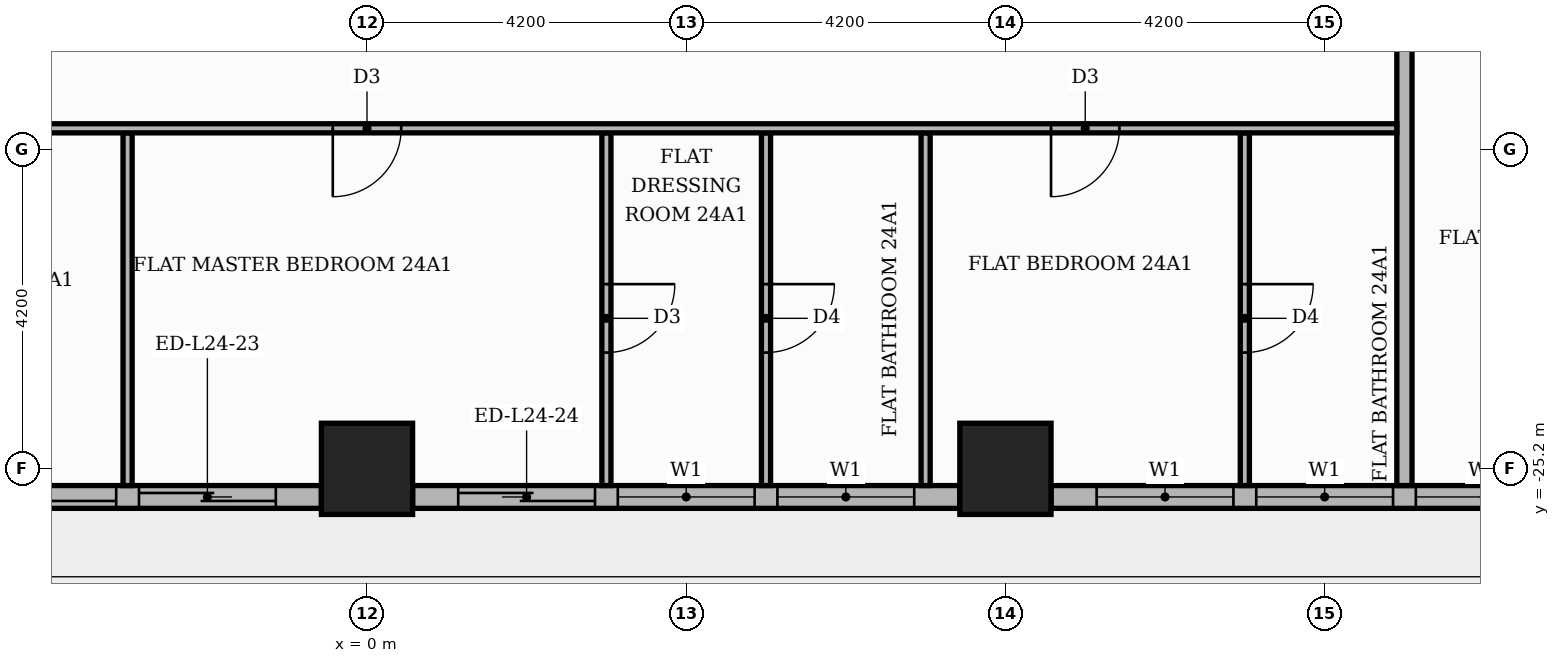
"""IFC4 building model, lengths in metres.
Left out: names, types, materials, properties, quantities, classifications, styles, units other than length and angle.
Written with IfcOpenShell. Run it as: python <this file> out.ifc"""

import sys

from ifc_helpers import new_model, si_unit, direction, frame, frame_2d, origin, origin_2d, place, context, subcontext, project, spatial, rectangle, extrude, element, fill, save


model = new_model("IFC4")
c1 = context("Model", 3, precision=1e-05, world=origin(), true_north=direction((0.0, 1.0)))
c2 = subcontext(c1, "Body", "Model", "MODEL_VIEW")
j1 = project(units=[si_unit("LENGTHUNIT", "METRE"), si_unit("PLANEANGLEUNIT", "RADIAN")], contexts=[c1])
p1 = place(None, origin())
s1 = spatial("IfcSite", under=j1, at=p1, CompositionType="ELEMENT")
p2 = place(p1, origin())
s2 = spatial("IfcBuilding", under=s1, at=p2, CompositionType="ELEMENT")
p3 = place(p2, frame((0.0, 0.0, 102.6)))
s3 = spatial("IfcBuildingStorey", under=s2, at=p3, CompositionType="ELEMENT", Elevation=102.6)
for number, where, z_axis, x_axis in (
    (1, (0.0, -25.2, 0.0), (0.0, 0.0, 1.0), (1.0, 0.0, 0.0)),
    (2, (8.4, -25.2, 0.0), (0.0, 0.0, 1.0), (1.0, 0.0, 0.0)),
):
    element("IfcColumn", number, at=place(p3, frame(where, z_axis=z_axis, x_axis=x_axis)), inside=s3, PredefinedType="COLUMN", context=c2, shape_type="SweptSolid", body=[
        extrude(rectangle(XDim=1.2, YDim=1.2, at=origin_2d()), origin(), (0.0, 0.0, 1.0), 3.9),
    ])
p4 = place(p3, frame((-7.8, -25.57, 0.0), z_axis=(0.0, 0.0, 1.0), x_axis=(1.0, 0.0, 0.0)))
e3 = element("IfcWall", 3, at=p4, inside=s3, PredefinedType="STANDARD", context=c2, shape_type="SweptSolid", body=[
    extrude(rectangle(XDim=7.2, YDim=0.3, at=frame_2d((3.6, 0.0))), origin(), (0.0, 0.0, 1.0), 3.48),
])
p5 = place(p4, frame((0.6, 0.0, 0.0)))
e4 = element("IfcOpeningElement", 4, at=p5, cuts=e3, PredefinedType="OPENING", context=c2, shape_type="SweptSolid", body=[
    extrude(rectangle(XDim=3.9, YDim=2.4, at=frame_2d((1.95, 1.2))), frame((0.0, 0.16, 0.0), z_axis=(0.0, -1.0, 0.0), x_axis=(1.0, 0.0, 0.0)), (0.0, 0.0, 1.0), 0.32),
])
p6 = place(p4, frame((4.8, 0.0, 0.0)))
e5 = element("IfcOpeningElement", 5, at=p6, cuts=e3, PredefinedType="OPENING", context=c2, shape_type="SweptSolid", body=[
    extrude(rectangle(XDim=1.8, YDim=2.4, at=frame_2d((0.9, 1.2))), frame((0.0, 0.16, 0.0), z_axis=(0.0, -1.0, 0.0), x_axis=(1.0, 0.0, 0.0)), (0.0, 0.0, 1.0), 0.32),
])
p7 = place(p3, frame((0.6, -25.57, 0.0), z_axis=(0.0, 0.0, 1.0), x_axis=(1.0, 0.0, 0.0)))
e6 = element("IfcWall", 6, at=p7, inside=s3, PredefinedType="STANDARD", context=c2, shape_type="SweptSolid", body=[
    extrude(rectangle(XDim=7.2, YDim=0.3, at=frame_2d((3.6, 0.0))), origin(), (0.0, 0.0, 1.0), 3.48),
])
p8 = place(p7, frame((0.6, 0.0, 0.0)))
e7 = element("IfcOpeningElement", 7, at=p8, cuts=e6, PredefinedType="OPENING", context=c2, shape_type="SweptSolid", body=[
    extrude(rectangle(XDim=1.8, YDim=2.4, at=frame_2d((0.9, 1.2))), frame((0.0, 0.16, 0.0), z_axis=(0.0, -1.0, 0.0), x_axis=(1.0, 0.0, 0.0)), (0.0, 0.0, 1.0), 0.32),
])
p9 = place(p7, frame((2.7, 0.0, 0.9)))
e8 = element("IfcOpeningElement", 8, at=p9, cuts=e6, PredefinedType="OPENING", context=c2, shape_type="SweptSolid", body=[
    extrude(rectangle(XDim=1.8, YDim=2.1, at=frame_2d((0.9, 1.05))), frame((0.0, 0.16, 0.0), z_axis=(0.0, -1.0, 0.0), x_axis=(1.0, 0.0, 0.0)), (0.0, 0.0, 1.0), 0.32),
])
p10 = place(p7, frame((4.8, 0.0, 0.9)))
e9 = element("IfcOpeningElement", 9, at=p10, cuts=e6, PredefinedType="OPENING", context=c2, shape_type="SweptSolid", body=[
    extrude(rectangle(XDim=1.8, YDim=2.1, at=frame_2d((0.9, 1.05))), frame((0.0, 0.16, 0.0), z_axis=(0.0, -1.0, 0.0), x_axis=(1.0, 0.0, 0.0)), (0.0, 0.0, 1.0), 0.32),
])
p11 = place(p3, frame((9.0, -25.57, 0.0), z_axis=(0.0, 0.0, 1.0), x_axis=(1.0, 0.0, 0.0)))
e10 = element("IfcWall", 10, at=p11, inside=s3, PredefinedType="STANDARD", context=c2, shape_type="SweptSolid", body=[
    extrude(rectangle(XDim=7.2, YDim=0.3, at=frame_2d((3.6, 0.0))), origin(), (0.0, 0.0, 1.0), 3.48),
])
p12 = place(p11, frame((0.6, 0.0, 0.9)))
e11 = element("IfcOpeningElement", 11, at=p12, cuts=e10, PredefinedType="OPENING", context=c2, shape_type="SweptSolid", body=[
    extrude(rectangle(XDim=1.8, YDim=2.1, at=frame_2d((0.9, 1.05))), frame((0.0, 0.16, 0.0), z_axis=(0.0, -1.0, 0.0), x_axis=(1.0, 0.0, 0.0)), (0.0, 0.0, 1.0), 0.32),
])
p13 = place(p11, frame((2.7, 0.0, 0.9)))
e12 = element("IfcOpeningElement", 12, at=p13, cuts=e10, PredefinedType="OPENING", context=c2, shape_type="SweptSolid", body=[
    extrude(rectangle(XDim=1.8, YDim=2.1, at=frame_2d((0.9, 1.05))), frame((0.0, 0.16, 0.0), z_axis=(0.0, -1.0, 0.0), x_axis=(1.0, 0.0, 0.0)), (0.0, 0.0, 1.0), 0.32),
])
p14 = place(p11, frame((4.8, 0.0, 0.9)))
e13 = element("IfcOpeningElement", 13, at=p14, cuts=e10, PredefinedType="OPENING", context=c2, shape_type="SweptSolid", body=[
    extrude(rectangle(XDim=1.8, YDim=2.1, at=frame_2d((0.9, 1.05))), frame((0.0, 0.16, 0.0), z_axis=(0.0, -1.0, 0.0), x_axis=(1.0, 0.0, 0.0)), (0.0, 0.0, 1.0), 0.32),
])
p15 = place(p3, frame((-3.15, -25.42, 0.0), z_axis=(0.0, 0.0, 1.0), x_axis=(0.0, 1.0, 0.0)))
e14 = element("IfcWall", 14, at=p15, inside=s3, PredefinedType="PARTITIONING", context=c2, shape_type="SweptSolid", body=[
    extrude(rectangle(XDim=4.64, YDim=0.12, at=frame_2d((2.32, 0.0))), origin(), (0.0, 0.0, 1.0), 3.48),
])
p16 = place(p3, frame((3.15, -25.42, 0.0), z_axis=(0.0, 0.0, 1.0), x_axis=(0.0, 1.0, 0.0)))
e15 = element("IfcWall", 15, at=p16, inside=s3, PredefinedType="PARTITIONING", context=c2, shape_type="SweptSolid", body=[
    extrude(rectangle(XDim=4.64, YDim=0.12, at=frame_2d((2.32, 0.0))), origin(), (0.0, 0.0, 1.0), 3.48),
])
p17 = place(p16, frame((1.75, 0.0, 0.0)))
e16 = element("IfcOpeningElement", 16, at=p17, cuts=e15, PredefinedType="OPENING", context=c2, shape_type="SweptSolid", body=[
    extrude(rectangle(XDim=0.9, YDim=2.1, at=frame_2d((0.45, 1.05))), frame((0.0, 0.07, 0.0), z_axis=(0.0, -1.0, 0.0), x_axis=(1.0, 0.0, 0.0)), (0.0, 0.0, 1.0), 0.14),
])
p18 = place(p3, frame((5.25, -25.42, 0.0), z_axis=(0.0, 0.0, 1.0), x_axis=(0.0, 1.0, 0.0)))
e17 = element("IfcWall", 17, at=p18, inside=s3, PredefinedType="PARTITIONING", context=c2, shape_type="SweptSolid", body=[
    extrude(rectangle(XDim=4.64, YDim=0.12, at=frame_2d((2.32, 0.0))), origin(), (0.0, 0.0, 1.0), 3.48),
])
p19 = place(p18, frame((1.75, 0.0, 0.0)))
e18 = element("IfcOpeningElement", 18, at=p19, cuts=e17, PredefinedType="OPENING", context=c2, shape_type="SweptSolid", body=[
    extrude(rectangle(XDim=0.9, YDim=2.1, at=frame_2d((0.45, 1.05))), frame((0.0, 0.07, 0.0), z_axis=(0.0, -1.0, 0.0), x_axis=(1.0, 0.0, 0.0)), (0.0, 0.0, 1.0), 0.14),
])
p20 = place(p3, frame((7.35, -25.42, 0.0), z_axis=(0.0, 0.0, 1.0), x_axis=(0.0, 1.0, 0.0)))
e19 = element("IfcWall", 19, at=p20, inside=s3, PredefinedType="PARTITIONING", context=c2, shape_type="SweptSolid", body=[
    extrude(rectangle(XDim=4.64, YDim=0.12, at=frame_2d((2.32, 0.0))), origin(), (0.0, 0.0, 1.0), 3.48),
])
p21 = place(p3, frame((11.55, -25.42, 0.0), z_axis=(0.0, 0.0, 1.0), x_axis=(0.0, 1.0, 0.0)))
e20 = element("IfcWall", 20, at=p21, inside=s3, PredefinedType="PARTITIONING", context=c2, shape_type="SweptSolid", body=[
    extrude(rectangle(XDim=4.64, YDim=0.12, at=frame_2d((2.32, 0.0))), origin(), (0.0, 0.0, 1.0), 3.48),
])
p22 = place(p21, frame((1.75, 0.0, 0.0)))
e21 = element("IfcOpeningElement", 21, at=p22, cuts=e20, PredefinedType="OPENING", context=c2, shape_type="SweptSolid", body=[
    extrude(rectangle(XDim=0.9, YDim=2.1, at=frame_2d((0.45, 1.05))), frame((0.0, 0.07, 0.0), z_axis=(0.0, -1.0, 0.0), x_axis=(1.0, 0.0, 0.0)), (0.0, 0.0, 1.0), 0.14),
])
p23 = place(p3, frame((13.65, -25.42, 0.0), z_axis=(0.0, 0.0, 1.0), x_axis=(0.0, 1.0, 0.0)))
e22 = element("IfcWall", 22, at=p23, inside=s3, PredefinedType="PARTITIONING", context=c2, shape_type="SweptSolid", body=[
    extrude(rectangle(XDim=11.67, YDim=0.2, at=frame_2d((5.835, 0.0))), origin(), (0.0, 0.0, 1.0), 3.48),
])
p24 = place(p3, frame((-25.42, -20.72, 0.0), z_axis=(0.0, 0.0, 1.0), x_axis=(1.0, 0.0, 0.0)))
e23 = element("IfcWall", 23, at=p24, inside=s3, PredefinedType="PARTITIONING", context=c2, shape_type="SweptSolid", body=[
    extrude(rectangle(XDim=38.97, YDim=0.12, at=frame_2d((19.485, 0.0))), origin(), (0.0, 0.0, 1.0), 3.48),
])
p25 = place(p24, frame((12.32, 0.0, 0.0)))
e24 = element("IfcOpeningElement", 24, at=p25, cuts=e23, PredefinedType="OPENING", context=c2, shape_type="SweptSolid", body=[
    extrude(rectangle(XDim=1.0, YDim=2.1, at=frame_2d((0.5, 1.05))), frame((0.0, 0.07, 0.0), z_axis=(0.0, -1.0, 0.0), x_axis=(1.0, 0.0, 0.0)), (0.0, 0.0, 1.0), 0.14),
])
p26 = place(p24, frame((17.57, 0.0, 0.0)))
e25 = element("IfcOpeningElement", 25, at=p26, cuts=e23, PredefinedType="OPENING", context=c2, shape_type="SweptSolid", body=[
    extrude(rectangle(XDim=1.0, YDim=2.1, at=frame_2d((0.5, 1.05))), frame((0.0, 0.07, 0.0), z_axis=(0.0, -1.0, 0.0), x_axis=(1.0, 0.0, 0.0)), (0.0, 0.0, 1.0), 0.14),
])
p27 = place(p24, frame((24.97, 0.0, 0.0)))
e26 = element("IfcOpeningElement", 26, at=p27, cuts=e23, PredefinedType="OPENING", context=c2, shape_type="SweptSolid", body=[
    extrude(rectangle(XDim=0.9, YDim=2.1, at=frame_2d((0.45, 1.05))), frame((0.0, 0.07, 0.0), z_axis=(0.0, -1.0, 0.0), x_axis=(1.0, 0.0, 0.0)), (0.0, 0.0, 1.0), 0.14),
])
p28 = place(p24, frame((34.42, 0.0, 0.0)))
e27 = element("IfcOpeningElement", 27, at=p28, cuts=e23, PredefinedType="OPENING", context=c2, shape_type="SweptSolid", body=[
    extrude(rectangle(XDim=0.9, YDim=2.1, at=frame_2d((0.45, 1.05))), frame((0.0, 0.07, 0.0), z_axis=(0.0, -1.0, 0.0), x_axis=(1.0, 0.0, 0.0)), (0.0, 0.0, 1.0), 0.14),
])
p29 = place(p5, origin())
e28 = element("IfcDoor", 28, at=p29, inside=s3, OperationType="SLIDING_TO_LEFT", PredefinedType="DOOR", context=c2, shape_type="SweptSolid", body=[
    extrude(rectangle(XDim=3.9, YDim=2.4, at=frame_2d((1.95, 1.2))), frame((0.0, 0.025, 0.0), z_axis=(0.0, -1.0, 0.0), x_axis=(1.0, 0.0, 0.0)), (0.0, 0.0, 1.0), 0.05),
])
fill(e4, e28)
p30 = place(p6, origin())
e29 = element("IfcDoor", 29, at=p30, inside=s3, OperationType="SLIDING_TO_RIGHT", PredefinedType="DOOR", context=c2, shape_type="SweptSolid", body=[
    extrude(rectangle(XDim=1.8, YDim=2.4, at=frame_2d((0.9, 1.2))), frame((0.0, 0.025, 0.0), z_axis=(0.0, -1.0, 0.0), x_axis=(1.0, 0.0, 0.0)), (0.0, 0.0, 1.0), 0.05),
])
fill(e5, e29)
p31 = place(p8, origin())
e30 = element("IfcDoor", 30, at=p31, inside=s3, OperationType="SLIDING_TO_LEFT", PredefinedType="DOOR", context=c2, shape_type="SweptSolid", body=[
    extrude(rectangle(XDim=1.8, YDim=2.4, at=frame_2d((0.9, 1.2))), frame((0.0, 0.025, 0.0), z_axis=(0.0, -1.0, 0.0), x_axis=(1.0, 0.0, 0.0)), (0.0, 0.0, 1.0), 0.05),
])
fill(e7, e30)
p32 = place(p9, origin())
e31 = element("IfcWindow", 31, at=p32, inside=s3, PartitioningType="SINGLE_PANEL", PredefinedType="WINDOW", context=c2, shape_type="SweptSolid", body=[
    extrude(rectangle(XDim=1.8, YDim=2.1, at=frame_2d((0.9, 1.05))), frame((0.0, 0.03, 0.0), z_axis=(0.0, -1.0, 0.0), x_axis=(1.0, 0.0, 0.0)), (0.0, 0.0, 1.0), 0.06),
])
fill(e8, e31)
p33 = place(p10, origin())
e32 = element("IfcWindow", 32, at=p33, inside=s3, PartitioningType="SINGLE_PANEL", PredefinedType="WINDOW", context=c2, shape_type="SweptSolid", body=[
    extrude(rectangle(XDim=1.8, YDim=2.1, at=frame_2d((0.9, 1.05))), frame((0.0, 0.03, 0.0), z_axis=(0.0, -1.0, 0.0), x_axis=(1.0, 0.0, 0.0)), (0.0, 0.0, 1.0), 0.06),
])
fill(e9, e32)
p34 = place(p12, origin())
e33 = element("IfcWindow", 33, at=p34, inside=s3, PartitioningType="SINGLE_PANEL", PredefinedType="WINDOW", context=c2, shape_type="SweptSolid", body=[
    extrude(rectangle(XDim=1.8, YDim=2.1, at=frame_2d((0.9, 1.05))), frame((0.0, 0.03, 0.0), z_axis=(0.0, -1.0, 0.0), x_axis=(1.0, 0.0, 0.0)), (0.0, 0.0, 1.0), 0.06),
])
fill(e11, e33)
p35 = place(p13, origin())
e34 = element("IfcWindow", 34, at=p35, inside=s3, PartitioningType="SINGLE_PANEL", PredefinedType="WINDOW", context=c2, shape_type="SweptSolid", body=[
    extrude(rectangle(XDim=1.8, YDim=2.1, at=frame_2d((0.9, 1.05))), frame((0.0, 0.03, 0.0), z_axis=(0.0, -1.0, 0.0), x_axis=(1.0, 0.0, 0.0)), (0.0, 0.0, 1.0), 0.06),
])
fill(e12, e34)
p36 = place(p14, origin())
e35 = element("IfcWindow", 35, at=p36, inside=s3, PartitioningType="SINGLE_PANEL", PredefinedType="WINDOW", context=c2, shape_type="SweptSolid", body=[
    extrude(rectangle(XDim=1.8, YDim=2.1, at=frame_2d((0.9, 1.05))), frame((0.0, 0.03, 0.0), z_axis=(0.0, -1.0, 0.0), x_axis=(1.0, 0.0, 0.0)), (0.0, 0.0, 1.0), 0.06),
])
fill(e13, e35)
p37 = place(p27, frame((0.9, 0.0, 0.0), z_axis=(0.0, 0.0, 1.0), x_axis=(-1.0, 0.0, 0.0)))
e36 = element("IfcDoor", 36, at=p37, inside=s3, OperationType="SINGLE_SWING_LEFT", PredefinedType="DOOR", context=c2, shape_type="SweptSolid", body=[
    extrude(rectangle(XDim=0.9, YDim=2.1, at=frame_2d((0.45, 1.05))), frame((0.0, 0.025, 0.0), z_axis=(0.0, -1.0, 0.0), x_axis=(1.0, 0.0, 0.0)), (0.0, 0.0, 1.0), 0.05),
])
fill(e26, e36)
p38 = place(p17, frame((0.9, 0.0, 0.0), z_axis=(0.0, 0.0, 1.0), x_axis=(-1.0, 0.0, 0.0)))
e37 = element("IfcDoor", 37, at=p38, inside=s3, OperationType="SINGLE_SWING_RIGHT", PredefinedType="DOOR", context=c2, shape_type="SweptSolid", body=[
    extrude(rectangle(XDim=0.9, YDim=2.1, at=frame_2d((0.45, 1.05))), frame((0.0, 0.025, 0.0), z_axis=(0.0, -1.0, 0.0), x_axis=(1.0, 0.0, 0.0)), (0.0, 0.0, 1.0), 0.05),
])
fill(e16, e37)
p39 = place(p19, frame((0.9, 0.0, 0.0), z_axis=(0.0, 0.0, 1.0), x_axis=(-1.0, 0.0, 0.0)))
e38 = element("IfcDoor", 38, at=p39, inside=s3, OperationType="SINGLE_SWING_RIGHT", PredefinedType="DOOR", context=c2, shape_type="SweptSolid", body=[
    extrude(rectangle(XDim=0.9, YDim=2.1, at=frame_2d((0.45, 1.05))), frame((0.0, 0.025, 0.0), z_axis=(0.0, -1.0, 0.0), x_axis=(1.0, 0.0, 0.0)), (0.0, 0.0, 1.0), 0.05),
])
fill(e18, e38)
p40 = place(p28, frame((0.9, 0.0, 0.0), z_axis=(0.0, 0.0, 1.0), x_axis=(-1.0, 0.0, 0.0)))
e39 = element("IfcDoor", 39, at=p40, inside=s3, OperationType="SINGLE_SWING_LEFT", PredefinedType="DOOR", context=c2, shape_type="SweptSolid", body=[
    extrude(rectangle(XDim=0.9, YDim=2.1, at=frame_2d((0.45, 1.05))), frame((0.0, 0.025, 0.0), z_axis=(0.0, -1.0, 0.0), x_axis=(1.0, 0.0, 0.0)), (0.0, 0.0, 1.0), 0.05),
])
fill(e27, e39)
p41 = place(p22, frame((0.9, 0.0, 0.0), z_axis=(0.0, 0.0, 1.0), x_axis=(-1.0, 0.0, 0.0)))
e40 = element("IfcDoor", 40, at=p41, inside=s3, OperationType="SINGLE_SWING_RIGHT", PredefinedType="DOOR", context=c2, shape_type="SweptSolid", body=[
    extrude(rectangle(XDim=0.9, YDim=2.1, at=frame_2d((0.45, 1.05))), frame((0.0, 0.025, 0.0), z_axis=(0.0, -1.0, 0.0), x_axis=(1.0, 0.0, 0.0)), (0.0, 0.0, 1.0), 0.05),
])
fill(e21, e40)
save(model, sys.argv[1])
